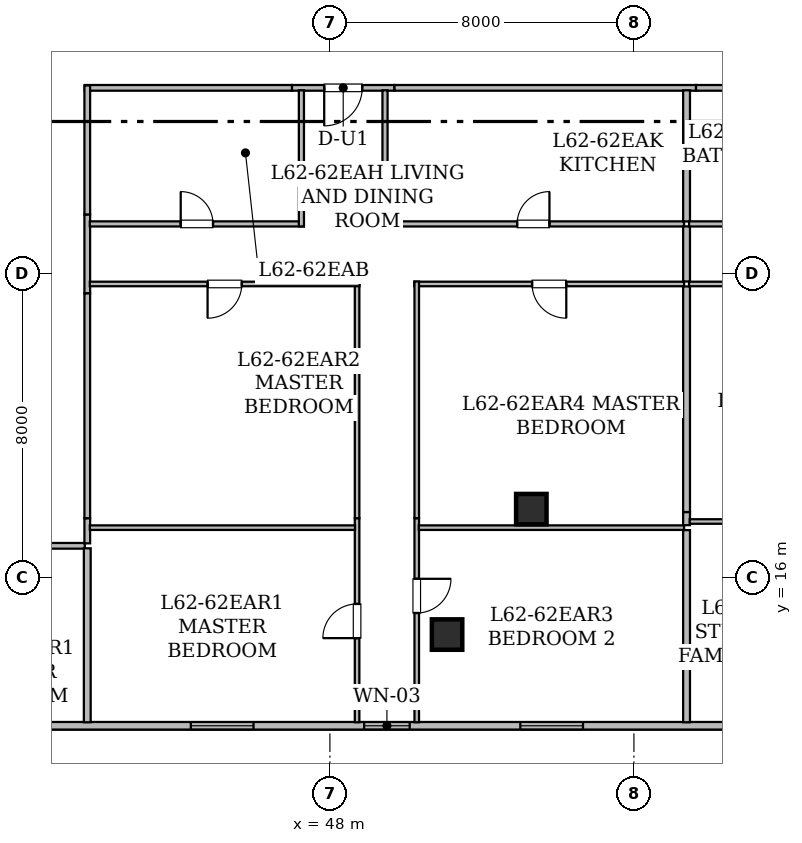
"""IFC4 building model, lengths in metres.
Left out: names, types, materials, properties, quantities, classifications, styles, units other than length and angle.
Written with IfcOpenShell. Run it as: python <this file> out.ifc"""

import sys

from ifc_helpers import new_model, si_unit, direction, frame, frame_2d, origin, origin_2d, place, context, subcontext, project, spatial, rectangle, hollow_rectangle, extrude, element, fill, save


model = new_model("IFC4")
c1 = context("Model", 3, precision=1e-05, world=origin(), true_north=direction((0.0, 1.0)))
c2 = subcontext(c1, "Body", "Model", "MODEL_VIEW")
j1 = project(units=[si_unit("LENGTHUNIT", "METRE"), si_unit("PLANEANGLEUNIT", "RADIAN")], contexts=[c1])
p1 = place(None, origin())
s1 = spatial("IfcSite", under=j1, at=p1, CompositionType="ELEMENT")
p2 = place(p1, origin())
s2 = spatial("IfcBuilding", under=s1, at=p2, CompositionType="ELEMENT")
p3 = place(p2, frame((0.0, 0.0, 242.75)))
s3 = spatial("IfcBuildingStorey", under=s2, at=p3, CompositionType="ELEMENT", Elevation=242.75)
for number, where, z_axis, x_axis in (
    (1, (51.083, 14.5, 0.0), (0.0, 0.0, 1.0), (1.0, 0.0, 0.0)),
    (2, (53.3, 17.8, 0.0), (0.0, 0.0, 1.0), (1.0, 0.0, 0.0)),
):
    element("IfcColumn", number, at=place(p3, frame(where, z_axis=z_axis, x_axis=x_axis)), inside=s3, PredefinedType="COLUMN", context=c2, shape_type="SweptSolid", body=[
        extrude(hollow_rectangle(XDim=0.8, YDim=0.8, WallThickness=0.04, at=origin_2d()), origin(), (0.0, 0.0, 1.0), 3.65),
    ])
p4 = place(p3, frame((65.696, 12.1, 0.0), z_axis=(0.0, 0.0, 1.0), x_axis=(-1.0, 0.0, 0.0)))
e3 = element("IfcWall", 3, at=p4, inside=s3, PredefinedType="STANDARD", context=c2, shape_type="SweptSolid", body=[
    extrude(rectangle(XDim=41.393, YDim=0.2, at=frame_2d((20.697, 0.0))), origin(), (0.0, 0.0, 1.0), 3.43),
])
p5 = place(p4, frame((39.16, 0.0, 0.85)))
e4 = element("IfcOpeningElement", 4, at=p5, cuts=e3, PredefinedType="OPENING", context=c2, shape_type="SweptSolid", body=[
    extrude(rectangle(XDim=1.65, YDim=1.55, at=frame_2d((0.825, 0.775))), frame((0.0, 0.11, 0.0), z_axis=(0.0, -1.0, 0.0), x_axis=(1.0, 0.0, 0.0)), (0.0, 0.0, 1.0), 0.22),
])
p6 = place(p4, frame((30.646, 0.0, 0.85)))
e5 = element("IfcOpeningElement", 5, at=p6, cuts=e3, PredefinedType="OPENING", context=c2, shape_type="SweptSolid", body=[
    extrude(rectangle(XDim=1.65, YDim=1.55, at=frame_2d((0.825, 0.775))), frame((0.0, 0.11, 0.0), z_axis=(0.0, -1.0, 0.0), x_axis=(1.0, 0.0, 0.0)), (0.0, 0.0, 1.0), 0.22),
])
p7 = place(p4, frame((25.339, 0.0, 0.85)))
e6 = element("IfcOpeningElement", 6, at=p7, cuts=e3, PredefinedType="OPENING", context=c2, shape_type="SweptSolid", body=[
    extrude(rectangle(XDim=1.65, YDim=1.55, at=frame_2d((0.825, 0.775))), frame((0.0, 0.11, 0.0), z_axis=(0.0, -1.0, 0.0), x_axis=(1.0, 0.0, 0.0)), (0.0, 0.0, 1.0), 0.22),
])
p8 = place(p4, frame((15.596, 0.0, 0.8)))
e7 = element("IfcOpeningElement", 7, at=p8, cuts=e3, PredefinedType="OPENING", context=c2, shape_type="SweptSolid", body=[
    extrude(rectangle(XDim=1.2, YDim=1.5, at=frame_2d((0.6, 0.75))), frame((0.0, 0.11, 0.0), z_axis=(0.0, -1.0, 0.0), x_axis=(1.0, 0.0, 0.0)), (0.0, 0.0, 1.0), 0.22),
])
p9 = place(p4, frame((19.706, 0.0, 0.85)))
e8 = element("IfcOpeningElement", 8, at=p9, cuts=e3, PredefinedType="OPENING", context=c2, shape_type="SweptSolid", body=[
    extrude(rectangle(XDim=1.65, YDim=1.55, at=frame_2d((0.825, 0.775))), frame((0.0, 0.11, 0.0), z_axis=(0.0, -1.0, 0.0), x_axis=(1.0, 0.0, 0.0)), (0.0, 0.0, 1.0), 0.22),
])
p10 = place(p4, frame((11.036, 0.0, 0.85)))
e9 = element("IfcOpeningElement", 9, at=p10, cuts=e3, PredefinedType="OPENING", context=c2, shape_type="SweptSolid", body=[
    extrude(rectangle(XDim=1.65, YDim=1.55, at=frame_2d((0.825, 0.775))), frame((0.0, 0.11, 0.0), z_axis=(0.0, -1.0, 0.0), x_axis=(1.0, 0.0, 0.0)), (0.0, 0.0, 1.0), 0.22),
])
p11 = place(p4, frame((1.526, 0.0, 0.8)))
e10 = element("IfcOpeningElement", 10, at=p11, cuts=e3, PredefinedType="OPENING", context=c2, shape_type="SweptSolid", body=[
    extrude(rectangle(XDim=1.2, YDim=1.5, at=frame_2d((0.6, 0.75))), frame((0.0, 0.11, 0.0), z_axis=(0.0, -1.0, 0.0), x_axis=(1.0, 0.0, 0.0)), (0.0, 0.0, 1.0), 0.22),
])
p12 = place(p4, frame((4.786, 0.0, 0.85)))
e11 = element("IfcOpeningElement", 11, at=p12, cuts=e3, PredefinedType="OPENING", context=c2, shape_type="SweptSolid", body=[
    extrude(rectangle(XDim=1.65, YDim=1.55, at=frame_2d((0.825, 0.775))), frame((0.0, 0.11, 0.0), z_axis=(0.0, -1.0, 0.0), x_axis=(1.0, 0.0, 0.0)), (0.0, 0.0, 1.0), 0.22),
])
p13 = place(p3, frame((41.55, 16.835, 0.0), z_axis=(0.0, 0.0, 1.0), x_axis=(-1.0, 0.0, 0.0)))
e12 = element("IfcWall", 12, at=p13, inside=s3, PredefinedType="STANDARD", context=c2, shape_type="SweptSolid", body=[
    extrude(rectangle(XDim=3.851, YDim=0.15, at=frame_2d((1.926, 0.0))), origin(), (0.0, 0.0, 1.0), 2.725),
])
p14 = place(p3, frame((49.699, 28.885, 0.0), z_axis=(0.0, 0.0, 1.0), x_axis=(-1.0, 0.0, 0.0)))
e13 = element("IfcWall", 13, at=p14, inside=s3, PredefinedType="STANDARD", context=c2, shape_type="SweptSolid", body=[
    extrude(rectangle(XDim=2.698, YDim=0.15, at=frame_2d((1.349, 0.0))), origin(), (0.0, 0.0, 1.0), 3.43),
])
p15 = place(p14, frame((0.849, 0.0, 0.0)))
e14 = element("IfcOpeningElement", 14, at=p15, cuts=e13, PredefinedType="OPENING", context=c2, shape_type="SweptSolid", body=[
    extrude(rectangle(XDim=1.0, YDim=2.15, at=frame_2d((0.5, 1.075))), frame((0.0, 0.085, 0.0), z_axis=(0.0, -1.0, 0.0), x_axis=(1.0, 0.0, 0.0)), (0.0, 0.0, 1.0), 0.17),
])
p16 = place(p3, frame((41.615, 25.554, 0.0), z_axis=(0.0, 0.0, 1.0), x_axis=(0.0, -1.0, 0.0)))
e15 = element("IfcWall", 15, at=p16, inside=s3, PredefinedType="STANDARD", context=c2, shape_type="SweptSolid", body=[
    extrude(rectangle(XDim=2.078, YDim=0.15, at=frame_2d((1.039, 0.0))), origin(), (0.0, 0.0, 1.0), 3.43),
])
p17 = place(p3, frame((47.001, 28.885, 0.0), z_axis=(0.0, 0.0, 1.0), x_axis=(-1.0, 0.0, 0.0)))
e16 = element("IfcWall", 16, at=p17, inside=s3, PredefinedType="STANDARD", context=c2, shape_type="SweptSolid", body=[
    extrude(rectangle(XDim=5.451, YDim=0.15, at=frame_2d((2.726, 0.0))), origin(), (0.0, 0.0, 1.0), 3.43),
])
p18 = place(p3, frame((41.615, 28.948, 0.0), z_axis=(0.0, 0.0, 1.0), x_axis=(0.0, -1.0, 0.0)))
e17 = element("IfcWall", 17, at=p18, inside=s3, PredefinedType="STANDARD", context=c2, shape_type="SweptSolid", body=[
    extrude(rectangle(XDim=3.394, YDim=0.15, at=frame_2d((1.697, 0.0))), origin(), (0.0, 0.0, 1.0), 3.43),
])
p19 = place(p3, frame((57.634, 28.885, 0.0), z_axis=(0.0, 0.0, 1.0), x_axis=(-1.0, 0.0, 0.0)))
e18 = element("IfcWall", 18, at=p19, inside=s3, PredefinedType="STANDARD", context=c2, shape_type="SweptSolid", body=[
    extrude(rectangle(XDim=7.935, YDim=0.15, at=frame_2d((3.968, 0.0))), origin(), (0.0, 0.0, 1.0), 2.725),
])
p20 = place(p3, frame((41.615, 17.562, 0.0), z_axis=(0.0, 0.0, 1.0), x_axis=(0.0, -1.0, 0.0)))
e19 = element("IfcWall", 19, at=p20, inside=s3, PredefinedType="STANDARD", context=c2, shape_type="SweptSolid", body=[
    extrude(rectangle(XDim=0.662, YDim=0.15, at=frame_2d((0.331, 0.0))), origin(), (0.0, 0.0, 1.0), 3.43),
])
p21 = place(p3, frame((41.615, 23.476, 0.0), z_axis=(0.0, 0.0, 1.0), x_axis=(0.0, -1.0, 0.0)))
e20 = element("IfcWall", 20, at=p21, inside=s3, PredefinedType="STANDARD", context=c2, shape_type="SweptSolid", body=[
    extrude(rectangle(XDim=5.914, YDim=0.15, at=frame_2d((2.957, 0.0))), origin(), (0.0, 0.0, 1.0), 2.725),
])
p22 = place(p3, frame((61.408, 28.885, 0.0), z_axis=(0.0, 0.0, 1.0), x_axis=(-1.0, 0.0, 0.0)))
e21 = element("IfcWall", 21, at=p22, inside=s3, PredefinedType="STANDARD", context=c2, shape_type="SweptSolid", body=[
    extrude(rectangle(XDim=3.774, YDim=0.15, at=frame_2d((1.887, 0.0))), origin(), (0.0, 0.0, 1.0), 3.43),
])
p23 = place(p3, frame((41.615, 16.77, 0.0), z_axis=(0.0, 0.0, 1.0), x_axis=(0.0, -1.0, 0.0)))
e22 = element("IfcWall", 22, at=p23, inside=s3, PredefinedType="STANDARD", context=c2, shape_type="SweptSolid", body=[
    extrude(rectangle(XDim=4.578, YDim=0.18, at=frame_2d((2.289, 0.0))), origin(), (0.0, 0.0, 1.0), 2.887),
])
p24 = place(p3, frame((41.682, 25.305, 0.0), z_axis=(0.0, 0.0, 1.0), x_axis=(1.0, 0.0, 0.0)))
e23 = element("IfcWall", 23, at=p24, inside=s3, PredefinedType="PARTITIONING", context=c2, shape_type="SweptSolid", body=[
    extrude(rectangle(XDim=5.633, YDim=0.135, at=frame_2d((2.816, 0.0))), origin(), (0.0, 0.0, 1.0), 3.43),
])
p25 = place(p24, frame((2.392, 0.0, 0.0)))
e24 = element("IfcOpeningElement", 24, at=p25, cuts=e23, PredefinedType="OPENING", context=c2, shape_type="SweptSolid", body=[
    extrude(rectangle(XDim=0.85, YDim=2.1, at=frame_2d((0.425, 1.05))), frame((0.0, 0.077, 0.0), z_axis=(0.0, -1.0, 0.0), x_axis=(1.0, 0.0, 0.0)), (0.0, 0.0, 1.0), 0.155),
])
for number, where, z_axis, x_axis in (
    (25, (47.25, 25.24, 0.0), (0.0, 0.0, 1.0), (0.0, 1.0, 0.0)),
    (26, (49.45, 28.82, 0.0), (0.0, 0.0, 1.0), (0.0, -1.0, 0.0)),
):
    element("IfcWall", number, at=place(p3, frame(where, z_axis=z_axis, x_axis=x_axis)), inside=s3, PredefinedType="PARTITIONING", context=c2, shape_type="SweptSolid", body=[
        extrude(rectangle(XDim=3.58, YDim=0.135, at=frame_2d((1.79, 0.0))), origin(), (0.0, 0.0, 1.0), 3.43),
    ])
p26 = place(p3, frame((49.385, 25.305, 0.0), z_axis=(0.0, 0.0, 1.0), x_axis=(1.0, 0.0, 0.0)))
e27 = element("IfcWall", 27, at=p26, inside=s3, PredefinedType="PARTITIONING", context=c2, shape_type="SweptSolid", body=[
    extrude(rectangle(XDim=7.935, YDim=0.135, at=frame_2d((3.968, 0.0))), origin(), (0.0, 0.0, 1.0), 2.725),
])
p27 = place(p26, frame((3.542, 0.0, 0.0)))
e28 = element("IfcOpeningElement", 28, at=p27, cuts=e27, PredefinedType="OPENING", context=c2, shape_type="SweptSolid", body=[
    extrude(rectangle(XDim=0.85, YDim=2.1, at=frame_2d((0.425, 1.05))), frame((0.0, 0.077, 0.0), z_axis=(0.0, -1.0, 0.0), x_axis=(1.0, 0.0, 0.0)), (0.0, 0.0, 1.0), 0.155),
])
p28 = place(p3, frame((48.715, 12.192, 0.0), z_axis=(0.0, 0.0, 1.0), x_axis=(0.0, 1.0, 0.0)))
e29 = element("IfcWall", 29, at=p28, inside=s3, PredefinedType="PARTITIONING", context=c2, shape_type="SweptSolid", body=[
    extrude(rectangle(XDim=5.37, YDim=0.12, at=frame_2d((2.685, 0.0))), origin(), (0.0, 0.0, 1.0), 2.725),
])
p29 = place(p28, frame((2.214, 0.0, 0.0)))
e30 = element("IfcOpeningElement", 30, at=p29, cuts=e29, PredefinedType="OPENING", context=c2, shape_type="SweptSolid", body=[
    extrude(rectangle(XDim=0.9, YDim=2.1, at=frame_2d((0.45, 1.05))), frame((0.0, 0.07, 0.0), z_axis=(0.0, -1.0, 0.0), x_axis=(1.0, 0.0, 0.0)), (0.0, 0.0, 1.0), 0.14),
])
p30 = place(p3, frame((48.715, 17.562, 0.0), z_axis=(0.0, 0.0, 1.0), x_axis=(0.0, 1.0, 0.0)))
e31 = element("IfcWall", 31, at=p30, inside=s3, PredefinedType="PARTITIONING", context=c2, shape_type="SweptSolid", body=[
    extrude(rectangle(XDim=6.228, YDim=0.12, at=frame_2d((3.114, 0.0))), origin(), (0.0, 0.0, 1.0), 2.725),
])
p31 = place(p3, frame((48.78, 23.725, 0.0), z_axis=(0.0, 0.0, 1.0), x_axis=(-1.0, 0.0, 0.0)))
e32 = element("IfcWall", 32, at=p31, inside=s3, PredefinedType="PARTITIONING", context=c2, shape_type="SweptSolid", body=[
    extrude(rectangle(XDim=7.098, YDim=0.12, at=frame_2d((3.549, 0.0))), origin(), (0.0, 0.0, 1.0), 3.43),
])
p32 = place(p31, frame((3.099, 0.0, 0.0)))
e33 = element("IfcOpeningElement", 33, at=p32, cuts=e32, PredefinedType="OPENING", context=c2, shape_type="SweptSolid", body=[
    extrude(rectangle(XDim=0.9, YDim=2.1, at=frame_2d((0.45, 1.05))), frame((0.0, 0.07, 0.0), z_axis=(0.0, -1.0, 0.0), x_axis=(1.0, 0.0, 0.0)), (0.0, 0.0, 1.0), 0.14),
])
p33 = place(p3, frame((50.285, 17.562, 0.0), z_axis=(0.0, 0.0, 1.0), x_axis=(0.0, -1.0, 0.0)))
e34 = element("IfcWall", 34, at=p33, inside=s3, PredefinedType="PARTITIONING", context=c2, shape_type="SweptSolid", body=[
    extrude(rectangle(XDim=5.37, YDim=0.12, at=frame_2d((2.685, 0.0))), origin(), (0.0, 0.0, 1.0), 2.725),
])
p34 = place(p33, frame((1.595, 0.0, 0.0)))
e35 = element("IfcOpeningElement", 35, at=p34, cuts=e34, PredefinedType="OPENING", context=c2, shape_type="SweptSolid", body=[
    extrude(rectangle(XDim=0.9, YDim=2.1, at=frame_2d((0.45, 1.05))), frame((0.0, 0.07, 0.0), z_axis=(0.0, -1.0, 0.0), x_axis=(1.0, 0.0, 0.0)), (0.0, 0.0, 1.0), 0.14),
])
p35 = place(p3, frame((57.32, 23.725, 0.0), z_axis=(0.0, 0.0, 1.0), x_axis=(-1.0, 0.0, 0.0)))
e36 = element("IfcWall", 36, at=p35, inside=s3, PredefinedType="PARTITIONING", context=c2, shape_type="SweptSolid", body=[
    extrude(rectangle(XDim=7.1, YDim=0.12, at=frame_2d((3.55, 0.0))), origin(), (0.0, 0.0, 1.0), 2.725),
])
p36 = place(p35, frame((3.1, 0.0, 0.0)))
e37 = element("IfcOpeningElement", 37, at=p36, cuts=e36, PredefinedType="OPENING", context=c2, shape_type="SweptSolid", body=[
    extrude(rectangle(XDim=0.9, YDim=2.1, at=frame_2d((0.45, 1.05))), frame((0.0, 0.07, 0.0), z_axis=(0.0, -1.0, 0.0), x_axis=(1.0, 0.0, 0.0)), (0.0, 0.0, 1.0), 0.14),
])
p37 = place(p3, frame((50.285, 23.79, 0.0), z_axis=(0.0, 0.0, 1.0), x_axis=(0.0, -1.0, 0.0)))
e38 = element("IfcWall", 38, at=p37, inside=s3, PredefinedType="PARTITIONING", context=c2, shape_type="SweptSolid", body=[
    extrude(rectangle(XDim=6.228, YDim=0.12, at=frame_2d((3.114, 0.0))), origin(), (0.0, 0.0, 1.0), 2.725),
])
p38 = place(p3, frame((57.385, 25.24, 0.0), z_axis=(0.0, 0.0, 1.0), x_axis=(0.0, -1.0, 0.0)))
e39 = element("IfcWall", 39, at=p38, inside=s3, PredefinedType="STANDARD", context=c2, shape_type="SweptSolid", body=[
    extrude(rectangle(XDim=1.45, YDim=0.18, at=frame_2d((0.725, 0.0))), origin(), (0.0, 0.0, 1.0), 3.43),
])
p39 = place(p3, frame((57.385, 28.82, 0.0), z_axis=(0.0, 0.0, 1.0), x_axis=(0.0, -1.0, 0.0)))
e40 = element("IfcWall", 40, at=p39, inside=s3, PredefinedType="STANDARD", context=c2, shape_type="SweptSolid", body=[
    extrude(rectangle(XDim=3.45, YDim=0.18, at=frame_2d((1.725, 0.0))), origin(), (0.0, 0.0, 1.0), 3.43),
])
p40 = place(p3, frame((41.682, 17.313, 0.0), z_axis=(0.0, 0.0, 1.0), x_axis=(1.0, 0.0, 0.0)))
e41 = element("IfcWall", 41, at=p40, inside=s3, PredefinedType="PARTITIONING", context=c2, shape_type="SweptSolid", body=[
    extrude(rectangle(XDim=6.979, YDim=0.12, at=frame_2d((3.49, 0.0))), origin(), (0.0, 0.0, 1.0), 2.725),
])
p41 = place(p3, frame((50.339, 17.313, 0.0), z_axis=(0.0, 0.0, 1.0), x_axis=(1.0, 0.0, 0.0)))
e42 = element("IfcWall", 42, at=p41, inside=s3, PredefinedType="PARTITIONING", context=c2, shape_type="SweptSolid", body=[
    extrude(rectangle(XDim=6.981, YDim=0.12, at=frame_2d((3.49, 0.0))), origin(), (0.0, 0.0, 1.0), 2.725),
])
p42 = place(p3, frame((57.385, 17.248, 0.0), z_axis=(0.0, 0.0, 1.0), x_axis=(0.0, -1.0, 0.0)))
e43 = element("IfcWall", 43, at=p42, inside=s3, PredefinedType="STANDARD", context=c2, shape_type="SweptSolid", body=[
    extrude(rectangle(XDim=5.056, YDim=0.18, at=frame_2d((2.528, 0.0))), origin(), (0.0, 0.0, 1.0), 2.725),
])
p43 = place(p3, frame((57.385, 17.724, 0.0), z_axis=(0.0, 0.0, 1.0), x_axis=(0.0, -1.0, 0.0)))
e44 = element("IfcWall", 44, at=p43, inside=s3, PredefinedType="STANDARD", context=c2, shape_type="SweptSolid", body=[
    extrude(rectangle(XDim=0.346, YDim=0.18, at=frame_2d((0.173, 0.0))), origin(), (0.0, 0.0, 1.0), 3.43),
])
p44 = place(p3, frame((57.385, 23.66, 0.0), z_axis=(0.0, 0.0, 1.0), x_axis=(0.0, -1.0, 0.0)))
e45 = element("IfcWall", 45, at=p44, inside=s3, PredefinedType="STANDARD", context=c2, shape_type="SweptSolid", body=[
    extrude(rectangle(XDim=5.936, YDim=0.18, at=frame_2d((2.968, 0.0))), origin(), (0.0, 0.0, 1.0), 2.725),
])
p45 = place(p3, frame((57.45, 25.305, 0.0), z_axis=(0.0, 0.0, 1.0), x_axis=(1.0, 0.0, 0.0)))
e46 = element("IfcWall", 46, at=p45, inside=s3, PredefinedType="PARTITIONING", context=c2, shape_type="SweptSolid", body=[
    extrude(rectangle(XDim=4.272, YDim=0.135, at=frame_2d((2.136, 0.0))), origin(), (0.0, 0.0, 1.0), 3.43),
])
p46 = place(p45, frame((1.711, 0.0, 0.0)))
e47 = element("IfcOpeningElement", 47, at=p46, cuts=e46, PredefinedType="OPENING", context=c2, shape_type="SweptSolid", body=[
    extrude(rectangle(XDim=0.85, YDim=2.1, at=frame_2d((0.425, 1.05))), frame((0.0, 0.077, 0.0), z_axis=(0.0, -1.0, 0.0), x_axis=(1.0, 0.0, 0.0)), (0.0, 0.0, 1.0), 0.155),
])
p47 = place(p3, frame((62.85, 23.725, 0.0), z_axis=(0.0, 0.0, 1.0), x_axis=(-1.0, 0.0, 0.0)))
e48 = element("IfcWall", 48, at=p47, inside=s3, PredefinedType="PARTITIONING", context=c2, shape_type="SweptSolid", body=[
    extrude(rectangle(XDim=5.4, YDim=0.12, at=frame_2d((2.7, 0.0))), origin(), (0.0, 0.0, 1.0), 3.43),
])
p48 = place(p3, frame((57.467, 17.475, 0.0), z_axis=(0.0, 0.0, 1.0), x_axis=(1.0, 0.0, 0.0)))
e49 = element("IfcWall", 49, at=p48, inside=s3, PredefinedType="PARTITIONING", context=c2, shape_type="SweptSolid", body=[
    extrude(rectangle(XDim=5.264, YDim=0.12, at=frame_2d((2.632, 0.0))), origin(), (0.0, 0.0, 1.0), 3.43),
])
p49 = place(p8, origin())
e50 = element("IfcWindow", 50, at=p49, inside=s3, PartitioningType="SINGLE_PANEL", PredefinedType="WINDOW", context=c2, shape_type="SweptSolid", body=[
    extrude(rectangle(XDim=1.2, YDim=1.5, at=frame_2d((0.6, 0.75))), frame((0.0, 0.03, 0.0), z_axis=(0.0, -1.0, 0.0), x_axis=(1.0, 0.0, 0.0)), (0.0, 0.0, 1.0), 0.06),
])
fill(e7, e50)
p50 = place(p9, origin())
e51 = element("IfcWindow", 51, at=p50, inside=s3, PartitioningType="SINGLE_PANEL", PredefinedType="WINDOW", context=c2, shape_type="SweptSolid", body=[
    extrude(rectangle(XDim=1.65, YDim=1.55, at=frame_2d((0.825, 0.775))), frame((0.0, 0.03, 0.0), z_axis=(0.0, -1.0, 0.0), x_axis=(1.0, 0.0, 0.0)), (0.0, 0.0, 1.0), 0.06),
])
fill(e8, e51)
p51 = place(p10, origin())
e52 = element("IfcWindow", 52, at=p51, inside=s3, PartitioningType="SINGLE_PANEL", PredefinedType="WINDOW", context=c2, shape_type="SweptSolid", body=[
    extrude(rectangle(XDim=1.65, YDim=1.55, at=frame_2d((0.825, 0.775))), frame((0.0, 0.03, 0.0), z_axis=(0.0, -1.0, 0.0), x_axis=(1.0, 0.0, 0.0)), (0.0, 0.0, 1.0), 0.06),
])
fill(e9, e52)
p52 = place(p15, origin())
e53 = element("IfcDoor", 53, at=p52, inside=s3, OperationType="SINGLE_SWING_RIGHT", PredefinedType="DOOR", context=c2, shape_type="SweptSolid", body=[
    extrude(rectangle(XDim=1.0, YDim=2.15, at=frame_2d((0.5, 1.075))), frame((0.0, 0.025, 0.0), z_axis=(0.0, -1.0, 0.0), x_axis=(1.0, 0.0, 0.0)), (0.0, 0.0, 1.0), 0.05),
])
fill(e14, e53)
p53 = place(p25, origin())
e54 = element("IfcDoor", 54, at=p53, inside=s3, OperationType="SINGLE_SWING_LEFT", PredefinedType="DOOR", context=c2, shape_type="SweptSolid", body=[
    extrude(rectangle(XDim=0.85, YDim=2.1, at=frame_2d((0.425, 1.05))), frame((0.0, 0.025, 0.0), z_axis=(0.0, -1.0, 0.0), x_axis=(1.0, 0.0, 0.0)), (0.0, 0.0, 1.0), 0.05),
])
fill(e24, e54)
p54 = place(p27, origin())
e55 = element("IfcDoor", 55, at=p54, inside=s3, OperationType="SINGLE_SWING_RIGHT", PredefinedType="DOOR", context=c2, shape_type="SweptSolid", body=[
    extrude(rectangle(XDim=0.85, YDim=2.1, at=frame_2d((0.425, 1.05))), frame((0.0, 0.025, 0.0), z_axis=(0.0, -1.0, 0.0), x_axis=(1.0, 0.0, 0.0)), (0.0, 0.0, 1.0), 0.05),
])
fill(e28, e55)
p55 = place(p29, origin())
e56 = element("IfcDoor", 56, at=p55, inside=s3, OperationType="SINGLE_SWING_LEFT", PredefinedType="DOOR", context=c2, shape_type="SweptSolid", body=[
    extrude(rectangle(XDim=0.9, YDim=2.1, at=frame_2d((0.45, 1.05))), frame((0.0, 0.025, 0.0), z_axis=(0.0, -1.0, 0.0), x_axis=(1.0, 0.0, 0.0)), (0.0, 0.0, 1.0), 0.05),
])
fill(e30, e56)
p56 = place(p32, origin())
e57 = element("IfcDoor", 57, at=p56, inside=s3, OperationType="SINGLE_SWING_RIGHT", PredefinedType="DOOR", context=c2, shape_type="SweptSolid", body=[
    extrude(rectangle(XDim=0.9, YDim=2.1, at=frame_2d((0.45, 1.05))), frame((0.0, 0.025, 0.0), z_axis=(0.0, -1.0, 0.0), x_axis=(1.0, 0.0, 0.0)), (0.0, 0.0, 1.0), 0.05),
])
fill(e33, e57)
p57 = place(p34, origin())
e58 = element("IfcDoor", 58, at=p57, inside=s3, OperationType="SINGLE_SWING_LEFT", PredefinedType="DOOR", context=c2, shape_type="SweptSolid", body=[
    extrude(rectangle(XDim=0.9, YDim=2.1, at=frame_2d((0.45, 1.05))), frame((0.0, 0.025, 0.0), z_axis=(0.0, -1.0, 0.0), x_axis=(1.0, 0.0, 0.0)), (0.0, 0.0, 1.0), 0.05),
])
fill(e35, e58)
p58 = place(p36, origin())
e59 = element("IfcDoor", 59, at=p58, inside=s3, OperationType="SINGLE_SWING_LEFT", PredefinedType="DOOR", context=c2, shape_type="SweptSolid", body=[
    extrude(rectangle(XDim=0.9, YDim=2.1, at=frame_2d((0.45, 1.05))), frame((0.0, 0.025, 0.0), z_axis=(0.0, -1.0, 0.0), x_axis=(1.0, 0.0, 0.0)), (0.0, 0.0, 1.0), 0.05),
])
fill(e37, e59)
save(model, sys.argv[1])
